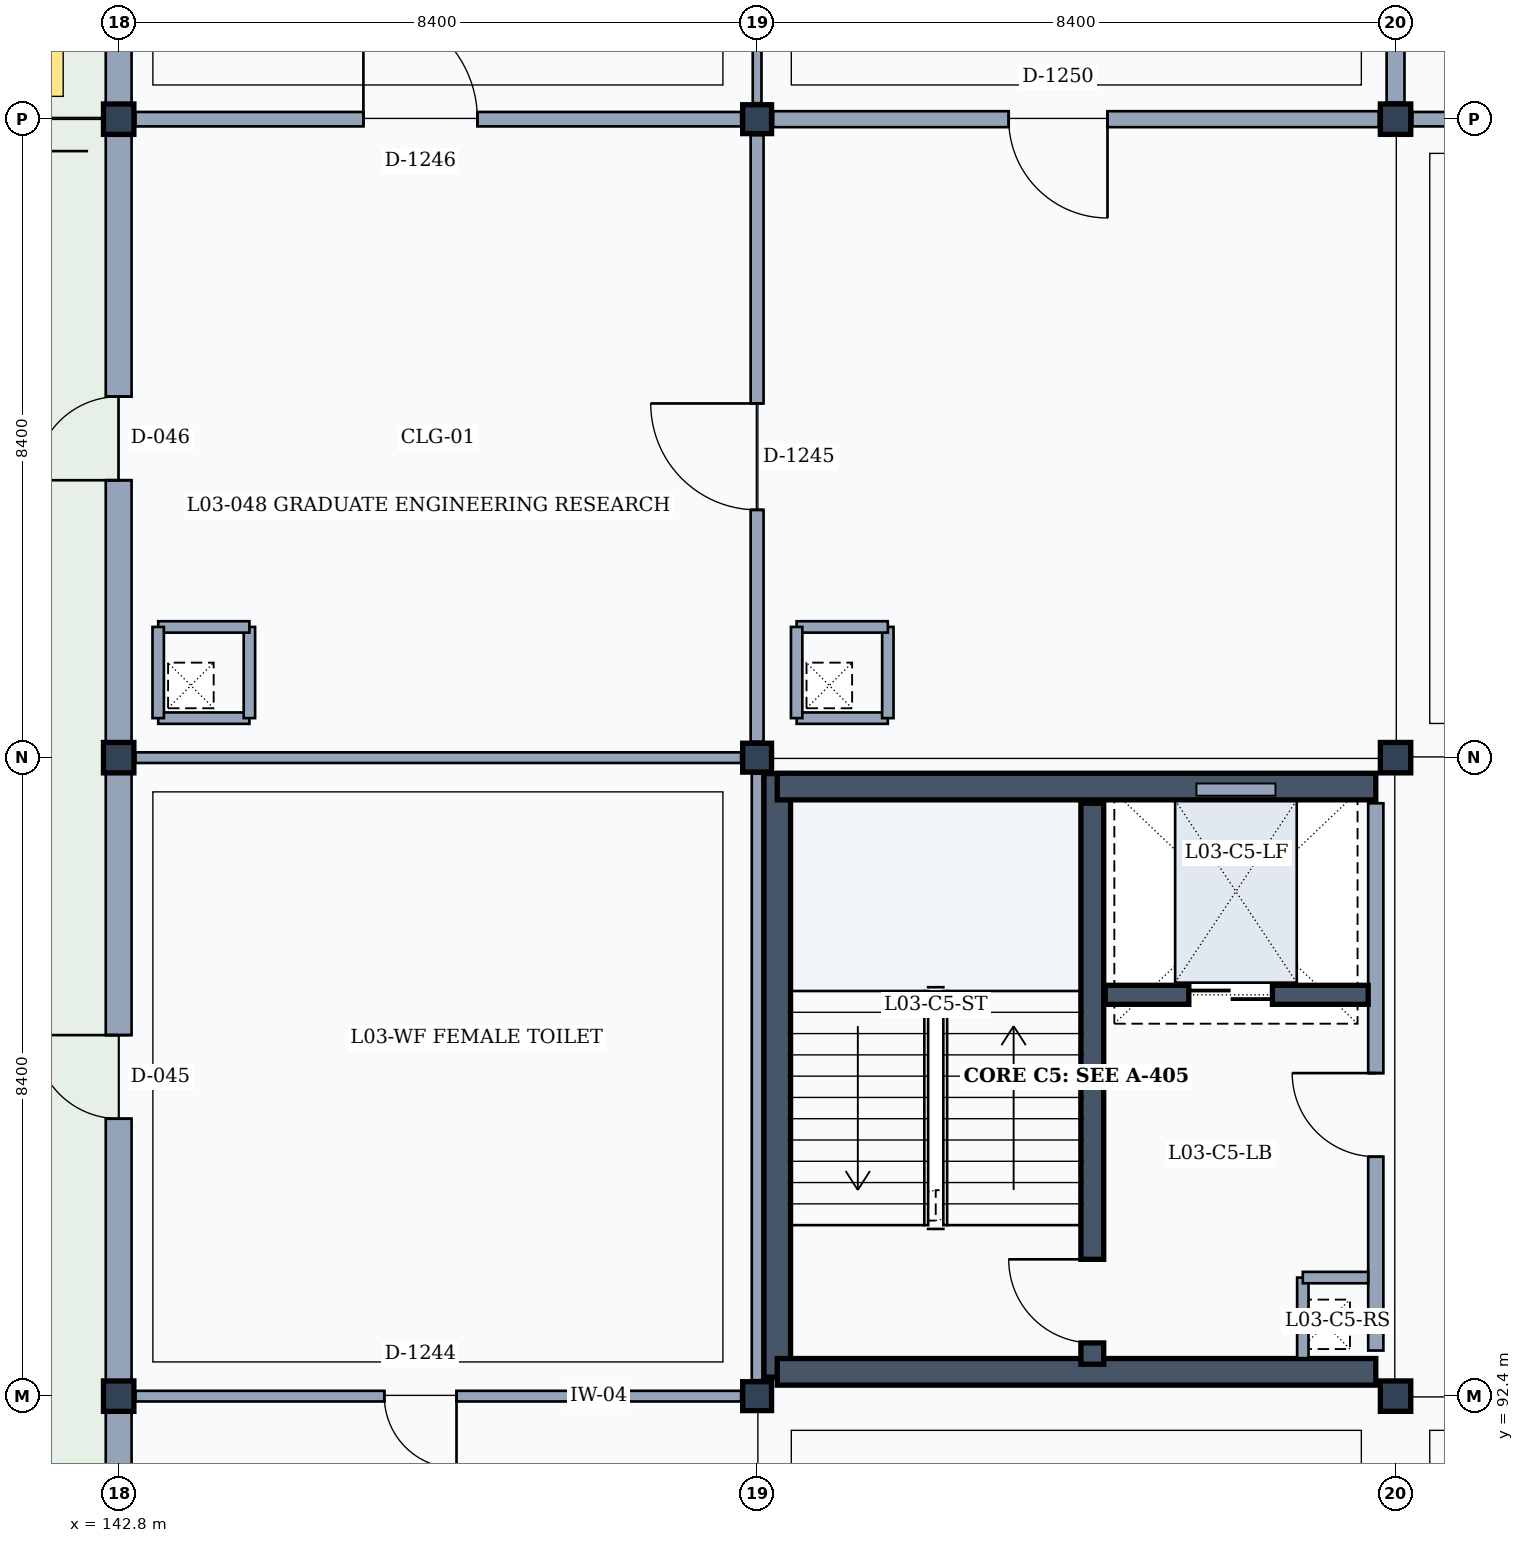
"""IFC4 building model, lengths in metres.
Left out: names, types, materials, properties, quantities, classifications, styles, units other than length and angle.
Written with IfcOpenShell. Run it as: python <this file> out.ifc"""

import sys

from ifc_helpers import new_model, si_unit, direction, frame, frame_2d, origin, origin_2d, place, context, subcontext, project, spatial, rectangle, extrude, element, fill, save


model = new_model("IFC4")
c1 = context("Model", 3, precision=1e-05, world=origin(), true_north=direction((0.0, 1.0)))
c2 = subcontext(c1, "Body", "Model", "MODEL_VIEW")
j1 = project(units=[si_unit("LENGTHUNIT", "METRE"), si_unit("PLANEANGLEUNIT", "RADIAN")], contexts=[c1])
p1 = place(None, origin())
s1 = spatial("IfcSite", under=j1, at=p1, CompositionType="ELEMENT")
p2 = place(p1, origin())
s2 = spatial("IfcBuilding", under=s1, at=p2, CompositionType="ELEMENT")
p3 = place(p2, frame((0.0, 0.0, 13.8)))
s3 = spatial("IfcBuildingStorey", under=s2, at=p3, CompositionType="ELEMENT", Elevation=13.8)
for number, where, z_axis, x_axis in (
    (1, (142.8, 92.4, 0.0), (0.0, 0.0, 1.0), (1.0, 0.0, 0.0)),
    (2, (142.8, 100.8, 0.0), (0.0, 0.0, 1.0), (1.0, 0.0, 0.0)),
    (3, (142.8, 109.2, 0.0), (0.0, 0.0, 1.0), (1.0, 0.0, 0.0)),
):
    element("IfcColumn", number, at=place(p3, frame(where, z_axis=z_axis, x_axis=x_axis)), inside=s3, PredefinedType="COLUMN", context=c2, shape_type="SweptSolid", body=[
        extrude(rectangle(XDim=0.4, YDim=0.4, at=origin_2d()), origin(), (0.0, 0.0, 1.0), 4.2),
    ])
for number, where, z_axis, x_axis in (
    (4, (151.2, 92.4, 0.0), (0.0, 0.0, 1.0), (1.0, 0.0, 0.0)),
    (5, (151.2, 100.8, 0.0), (0.0, 0.0, 1.0), (1.0, 0.0, 0.0)),
    (6, (151.2, 109.2, 0.0), (0.0, 0.0, 1.0), (1.0, 0.0, 0.0)),
):
    element("IfcColumn", number, at=place(p3, frame(where, z_axis=z_axis, x_axis=x_axis)), inside=s3, PredefinedType="COLUMN", context=c2, shape_type="SweptSolid", body=[
        extrude(rectangle(XDim=0.38, YDim=0.38, at=origin_2d()), origin(), (0.0, 0.0, 1.0), 4.2),
    ])
for number, where, z_axis, x_axis in (
    (7, (159.6, 92.4, 0.0), (0.0, 0.0, 1.0), (1.0, 0.0, 0.0)),
    (8, (159.6, 100.8, 0.0), (0.0, 0.0, 1.0), (1.0, 0.0, 0.0)),
    (9, (159.6, 109.2, 0.0), (0.0, 0.0, 1.0), (1.0, 0.0, 0.0)),
):
    element("IfcColumn", number, at=place(p3, frame(where, z_axis=z_axis, x_axis=x_axis)), inside=s3, PredefinedType="COLUMN", context=c2, shape_type="SweptSolid", body=[
        extrude(rectangle(XDim=0.4, YDim=0.4, at=origin_2d()), origin(), (0.0, 0.0, 1.0), 4.2),
    ])
p4 = place(p3, frame((142.8, 84.2, 0.0), z_axis=(0.0, 0.0, 1.0), x_axis=(0.0, 1.0, 0.0)))
e10 = element("IfcWall", 10, at=p4, inside=s3, PredefinedType="SOLIDWALL", context=c2, shape_type="SweptSolid", body=[
    extrude(rectangle(XDim=8.0, YDim=0.34, at=frame_2d((4.0, 0.0))), origin(), (0.0, 0.0, 1.0), 3.36),
])
p5 = place(p4, frame((3.45, 0.0, 0.0)))
e11 = element("IfcOpeningElement", 11, at=p5, cuts=e10, PredefinedType="OPENING", context=c2, shape_type="SweptSolid", body=[
    extrude(rectangle(XDim=1.1, YDim=2.2, at=frame_2d((0.55, 1.1))), frame((0.0, 0.18, 0.0), z_axis=(0.0, -1.0, 0.0), x_axis=(1.0, 0.0, 0.0)), (0.0, 0.0, 1.0), 0.36),
])
p6 = place(p3, frame((142.8, 92.6, 0.0), z_axis=(0.0, 0.0, 1.0), x_axis=(0.0, 1.0, 0.0)))
e12 = element("IfcWall", 12, at=p6, inside=s3, PredefinedType="SOLIDWALL", context=c2, shape_type="SweptSolid", body=[
    extrude(rectangle(XDim=8.0, YDim=0.34, at=frame_2d((4.0, 0.0))), origin(), (0.0, 0.0, 1.0), 3.36),
])
p7 = place(p6, frame((3.45, 0.0, 0.0)))
e13 = element("IfcOpeningElement", 13, at=p7, cuts=e12, PredefinedType="OPENING", context=c2, shape_type="SweptSolid", body=[
    extrude(rectangle(XDim=1.1, YDim=2.2, at=frame_2d((0.55, 1.1))), frame((0.0, 0.18, 0.0), z_axis=(0.0, -1.0, 0.0), x_axis=(1.0, 0.0, 0.0)), (0.0, 0.0, 1.0), 0.36),
])
p8 = place(p3, frame((142.8, 101.0, 0.0), z_axis=(0.0, 0.0, 1.0), x_axis=(0.0, 1.0, 0.0)))
e14 = element("IfcWall", 14, at=p8, inside=s3, PredefinedType="SOLIDWALL", context=c2, shape_type="SweptSolid", body=[
    extrude(rectangle(XDim=8.0, YDim=0.34, at=frame_2d((4.0, 0.0))), origin(), (0.0, 0.0, 1.0), 3.36),
])
p9 = place(p8, frame((3.45, 0.0, 0.0)))
e15 = element("IfcOpeningElement", 15, at=p9, cuts=e14, PredefinedType="OPENING", context=c2, shape_type="SweptSolid", body=[
    extrude(rectangle(XDim=1.1, YDim=2.2, at=frame_2d((0.55, 1.1))), frame((0.0, 0.18, 0.0), z_axis=(0.0, -1.0, 0.0), x_axis=(1.0, 0.0, 0.0)), (0.0, 0.0, 1.0), 0.36),
])
p10 = place(p3, frame((142.8, 109.4, 0.0), z_axis=(0.0, 0.0, 1.0), x_axis=(0.0, 1.0, 0.0)))
e16 = element("IfcWall", 16, at=p10, inside=s3, PredefinedType="SOLIDWALL", context=c2, shape_type="SweptSolid", body=[
    extrude(rectangle(XDim=8.0, YDim=0.34, at=frame_2d((4.0, 0.0))), origin(), (0.0, 0.0, 1.0), 3.36),
])
p11 = place(p10, frame((3.35, 0.0, 0.9)))
e17 = element("IfcOpeningElement", 17, at=p11, cuts=e16, PredefinedType="OPENING", context=c2, shape_type="SweptSolid", body=[
    extrude(rectangle(XDim=1.3, YDim=1.75, at=frame_2d((0.65, 0.875))), frame((0.0, 0.18, 0.0), z_axis=(0.0, -1.0, 0.0), x_axis=(1.0, 0.0, 0.0)), (0.0, 0.0, 1.0), 0.36),
])
p12 = place(p3, frame((151.465, 92.65, 0.0), z_axis=(0.0, 0.0, 1.0), x_axis=(0.0, 1.0, 0.0)))
e18 = element("IfcWall", 18, at=p12, inside=s3, PredefinedType="SHEAR", context=c2, shape_type="SweptSolid", body=[
    extrude(rectangle(XDim=7.94, YDim=0.35, at=frame_2d((3.97, 0.0))), origin(), (0.0, 0.0, 1.0), 3.98),
])
p13 = place(p3, frame((151.465, 100.42, 0.0), z_axis=(0.0, 0.0, 1.0), x_axis=(1.0, 0.0, 0.0)))
e19 = element("IfcWall", 19, at=p13, inside=s3, PredefinedType="SHEAR", context=c2, shape_type="SweptSolid", body=[
    extrude(rectangle(XDim=7.875, YDim=0.35, at=frame_2d((3.938, 0.0))), origin(), (0.0, 0.0, 1.0), 3.98),
])
p14 = place(p3, frame((159.34, 100.2, 0.0), z_axis=(0.0, 0.0, 1.0), x_axis=(0.0, -1.0, 0.0)))
e20 = element("IfcWall", 20, at=p14, inside=s3, PredefinedType="PARTITIONING", context=c2, shape_type="SweptSolid", body=[
    extrude(rectangle(XDim=7.2, YDim=0.2, at=frame_2d((3.6, 0.0))), origin(), (0.0, 0.0, 1.0), 3.32),
])
p15 = place(p14, frame((3.55, 0.0, 0.0)))
e21 = element("IfcOpeningElement", 21, at=p15, cuts=e20, PredefinedType="OPENING", context=c2, shape_type="SweptSolid", body=[
    extrude(rectangle(XDim=1.1, YDim=2.15, at=frame_2d((0.55, 1.075))), frame((0.0, 0.11, 0.0), z_axis=(0.0, -1.0, 0.0), x_axis=(1.0, 0.0, 0.0)), (0.0, 0.0, 1.0), 0.22),
])
p16 = place(p3, frame((159.34, 92.72, 0.0), z_axis=(0.0, 0.0, 1.0), x_axis=(-1.0, 0.0, 0.0)))
e22 = element("IfcWall", 22, at=p16, inside=s3, PredefinedType="SHEAR", context=c2, shape_type="SweptSolid", body=[
    extrude(rectangle(XDim=7.875, YDim=0.35, at=frame_2d((3.938, 0.0))), origin(), (0.0, 0.0, 1.0), 3.98),
])
p17 = place(p3, frame((155.61, 92.82, 0.0), z_axis=(0.0, 0.0, 1.0), x_axis=(0.0, 1.0, 0.0)))
e23 = element("IfcWall", 23, at=p17, inside=s3, PredefinedType="SHEAR", context=c2, shape_type="SweptSolid", body=[
    extrude(rectangle(XDim=7.38, YDim=0.3, at=frame_2d((3.69, 0.0))), origin(), (0.0, 0.0, 1.0), 3.98),
])
p18 = place(p17, frame((0.28, 0.0, 0.0)))
e24 = element("IfcOpeningElement", 24, at=p18, cuts=e23, PredefinedType="OPENING", context=c2, shape_type="SweptSolid", body=[
    extrude(rectangle(XDim=1.1, YDim=2.15, at=frame_2d((0.55, 1.075))), frame((0.0, 0.16, 0.0), z_axis=(0.0, -1.0, 0.0), x_axis=(1.0, 0.0, 0.0)), (0.0, 0.0, 1.0), 0.32),
])
p19 = place(p3, frame((158.38, 93.96, 0.0), z_axis=(0.0, 0.0, 1.0), x_axis=(0.0, -1.0, 0.0)))
e25 = element("IfcWall", 25, at=p19, inside=s3, PredefinedType="PARTITIONING", context=c2, shape_type="SweptSolid", body=[
    extrude(rectangle(XDim=1.06, YDim=0.15, at=frame_2d((0.53, 0.0))), origin(), (0.0, 0.0, 1.0), 3.32),
])
p20 = place(p3, frame((158.38, 93.96, 0.0), z_axis=(0.0, 0.0, 1.0), x_axis=(1.0, 0.0, 0.0)))
e26 = element("IfcWall", 26, at=p20, inside=s3, PredefinedType="PARTITIONING", context=c2, shape_type="SweptSolid", body=[
    extrude(rectangle(XDim=0.86, YDim=0.15, at=frame_2d((0.43, 0.0))), origin(), (0.0, 0.0, 1.0), 3.32),
])
p21 = place(p3, frame((155.78, 97.68, 0.0), z_axis=(0.0, 0.0, 1.0), x_axis=(1.0, 0.0, 0.0)))
e27 = element("IfcWall", 27, at=p21, inside=s3, PredefinedType="SHEAR", context=c2, shape_type="SweptSolid", body=[
    extrude(rectangle(XDim=3.46, YDim=0.25, at=frame_2d((1.73, 0.0))), origin(), (0.0, 0.0, 1.0), 3.98),
])
p22 = place(p21, frame((1.1, 0.0, 0.0)))
e28 = element("IfcOpeningElement", 28, at=p22, cuts=e27, PredefinedType="OPENING", context=c2, shape_type="SweptSolid", body=[
    extrude(rectangle(XDim=1.1, YDim=2.15, at=frame_2d((0.55, 1.075))), frame((0.0, 0.135, 0.0), z_axis=(0.0, -1.0, 0.0), x_axis=(1.0, 0.0, 0.0)), (0.0, 0.0, 1.0), 0.27),
])
for number, where, z_axis, x_axis in (
    (29, (143.32, 101.32, 0.0), (0.0, 0.0, 1.0), (1.0, 0.0, 0.0)),
    (30, (144.52, 101.32, 0.0), (0.0, 0.0, 1.0), (0.0, 1.0, 0.0)),
    (31, (144.52, 102.52, 0.0), (0.0, 0.0, 1.0), (-1.0, 0.0, 0.0)),
    (32, (143.32, 102.52, 0.0), (0.0, 0.0, 1.0), (0.0, -1.0, 0.0)),
    (33, (151.72, 101.32, 0.0), (0.0, 0.0, 1.0), (1.0, 0.0, 0.0)),
    (34, (152.92, 101.32, 0.0), (0.0, 0.0, 1.0), (0.0, 1.0, 0.0)),
    (35, (152.92, 102.52, 0.0), (0.0, 0.0, 1.0), (-1.0, 0.0, 0.0)),
    (36, (151.72, 102.52, 0.0), (0.0, 0.0, 1.0), (0.0, -1.0, 0.0)),
):
    element("IfcWall", number, at=place(p3, frame(where, z_axis=z_axis, x_axis=x_axis)), inside=s3, PredefinedType="PARTITIONING", context=c2, shape_type="SweptSolid", body=[
        extrude(rectangle(XDim=1.2, YDim=0.15, at=frame_2d((0.6, 0.0))), origin(), (0.0, 0.0, 1.0), 3.98),
    ])
p23 = place(p3, frame((143.02, 92.4, 0.0), z_axis=(0.0, 0.0, 1.0), x_axis=(1.0, 0.0, 0.0)))
e37 = element("IfcWall", 37, at=p23, inside=s3, PredefinedType="PARTITIONING", context=c2, shape_type="SweptSolid", body=[
    extrude(rectangle(XDim=7.97, YDim=0.14, at=frame_2d((3.985, 0.0))), origin(), (0.0, 0.0, 1.0), 3.22),
])
p24 = place(p23, frame((3.275, 0.0, 0.0)))
e38 = element("IfcOpeningElement", 38, at=p24, cuts=e37, PredefinedType="OPENING", context=c2, shape_type="SweptSolid", body=[
    extrude(rectangle(XDim=0.95, YDim=2.15, at=frame_2d((0.475, 1.075))), frame((0.0, 0.08, 0.0), z_axis=(0.0, -1.0, 0.0), x_axis=(1.0, 0.0, 0.0)), (0.0, 0.0, 1.0), 0.16),
])
p25 = place(p3, frame((151.2, 92.61, 0.0), z_axis=(0.0, 0.0, 1.0), x_axis=(0.0, 1.0, 0.0)))
e39 = element("IfcWall", 39, at=p25, inside=s3, PredefinedType="PARTITIONING", context=c2, shape_type="SweptSolid", body=[
    extrude(rectangle(XDim=7.98, YDim=0.14, at=frame_2d((3.99, 0.0))), origin(), (0.0, 0.0, 1.0), 3.32),
])
p26 = place(p3, frame((143.02, 100.8, 0.0), z_axis=(0.0, 0.0, 1.0), x_axis=(1.0, 0.0, 0.0)))
e40 = element("IfcWall", 40, at=p26, inside=s3, PredefinedType="PARTITIONING", context=c2, shape_type="SweptSolid", body=[
    extrude(rectangle(XDim=7.97, YDim=0.14, at=frame_2d((3.985, 0.0))), origin(), (0.0, 0.0, 1.0), 3.22),
])
p27 = place(p3, frame((151.2, 101.01, 0.0), z_axis=(0.0, 0.0, 1.0), x_axis=(0.0, 1.0, 0.0)))
e41 = element("IfcWall", 41, at=p27, inside=s3, PredefinedType="PARTITIONING", context=c2, shape_type="SweptSolid", body=[
    extrude(rectangle(XDim=7.98, YDim=0.17, at=frame_2d((3.99, 0.0))), origin(), (0.0, 0.0, 1.0), 3.32),
])
p28 = place(p27, frame((3.05, 0.0, 0.0)))
e42 = element("IfcOpeningElement", 42, at=p28, cuts=e41, PredefinedType="OPENING", context=c2, shape_type="SweptSolid", body=[
    extrude(rectangle(XDim=1.4, YDim=2.25, at=frame_2d((0.7, 1.125))), frame((0.0, 0.095, 0.0), z_axis=(0.0, -1.0, 0.0), x_axis=(1.0, 0.0, 0.0)), (0.0, 0.0, 1.0), 0.19),
])
p29 = place(p3, frame((143.02, 109.2, 0.0), z_axis=(0.0, 0.0, 1.0), x_axis=(1.0, 0.0, 0.0)))
e43 = element("IfcWall", 43, at=p29, inside=s3, PredefinedType="PARTITIONING", context=c2, shape_type="SweptSolid", body=[
    extrude(rectangle(XDim=7.97, YDim=0.19, at=frame_2d((3.985, 0.0))), origin(), (0.0, 0.0, 1.0), 3.22),
])
p30 = place(p29, frame((3.0, 0.0, 0.0)))
e44 = element("IfcOpeningElement", 44, at=p30, cuts=e43, PredefinedType="OPENING", context=c2, shape_type="SweptSolid", body=[
    extrude(rectangle(XDim=1.5, YDim=2.3, at=frame_2d((0.75, 1.15))), frame((0.0, 0.105, 0.0), z_axis=(0.0, -1.0, 0.0), x_axis=(1.0, 0.0, 0.0)), (0.0, 0.0, 1.0), 0.21),
])
p31 = place(p3, frame((151.2, 109.41, 0.0), z_axis=(0.0, 0.0, 1.0), x_axis=(0.0, 1.0, 0.0)))
e45 = element("IfcWall", 45, at=p31, inside=s3, PredefinedType="PARTITIONING", context=c2, shape_type="SweptSolid", body=[
    extrude(rectangle(XDim=7.98, YDim=0.115, at=frame_2d((3.99, 0.0))), origin(), (0.0, 0.0, 1.0), 3.32),
])
p32 = place(p3, frame((151.41, 109.2, 0.0), z_axis=(0.0, 0.0, 1.0), x_axis=(1.0, 0.0, 0.0)))
e46 = element("IfcWall", 46, at=p32, inside=s3, PredefinedType="PARTITIONING", context=c2, shape_type="SweptSolid", body=[
    extrude(rectangle(XDim=7.97, YDim=0.21, at=frame_2d((3.985, 0.0))), origin(), (0.0, 0.0, 1.0), 3.22),
])
p33 = place(p32, frame((3.1, 0.0, 0.0)))
e47 = element("IfcOpeningElement", 47, at=p33, cuts=e46, PredefinedType="OPENING", context=c2, shape_type="SweptSolid", body=[
    extrude(rectangle(XDim=1.3, YDim=2.2, at=frame_2d((0.65, 1.1))), frame((0.0, 0.115, 0.0), z_axis=(0.0, -1.0, 0.0), x_axis=(1.0, 0.0, 0.0)), (0.0, 0.0, 1.0), 0.23),
])
p34 = place(p3, frame((159.6, 109.42, 0.0), z_axis=(0.0, 0.0, 1.0), x_axis=(0.0, 1.0, 0.0)))
e48 = element("IfcWall", 48, at=p34, inside=s3, PredefinedType="PARTITIONING", context=c2, shape_type="SweptSolid", body=[
    extrude(rectangle(XDim=7.96, YDim=0.235, at=frame_2d((3.98, 0.0))), origin(), (0.0, 0.0, 1.0), 3.32),
])
p35 = place(p3, frame((159.82, 109.2, 0.0), z_axis=(0.0, 0.0, 1.0), x_axis=(1.0, 0.0, 0.0)))
e49 = element("IfcWall", 49, at=p35, inside=s3, PredefinedType="PARTITIONING", context=c2, shape_type="SweptSolid", body=[
    extrude(rectangle(XDim=7.97, YDim=0.19, at=frame_2d((3.985, 0.0))), origin(), (0.0, 0.0, 1.0), 3.22),
])
p36 = place(p35, frame((3.025, 0.0, 0.0)))
e50 = element("IfcOpeningElement", 50, at=p36, cuts=e49, PredefinedType="OPENING", context=c2, shape_type="SweptSolid", body=[
    extrude(rectangle(XDim=1.45, YDim=2.35, at=frame_2d((0.725, 1.175))), frame((0.0, 0.105, 0.0), z_axis=(0.0, -1.0, 0.0), x_axis=(1.0, 0.0, 0.0)), (0.0, 0.0, 1.0), 0.21),
])
p37 = place(p7, origin())
e51 = element("IfcDoor", 51, at=p37, inside=s3, OperationType="SINGLE_SWING_RIGHT", PredefinedType="DOOR", context=c2, shape_type="SweptSolid", body=[
    extrude(rectangle(XDim=1.1, YDim=2.2, at=frame_2d((0.55, 1.1))), frame((0.0, 0.025, 0.0), z_axis=(0.0, -1.0, 0.0), x_axis=(1.0, 0.0, 0.0)), (0.0, 0.0, 1.0), 0.05),
])
fill(e13, e51)
p38 = place(p9, origin())
e52 = element("IfcDoor", 52, at=p38, inside=s3, OperationType="SINGLE_SWING_LEFT", PredefinedType="DOOR", context=c2, shape_type="SweptSolid", body=[
    extrude(rectangle(XDim=1.1, YDim=2.2, at=frame_2d((0.55, 1.1))), frame((0.0, 0.025, 0.0), z_axis=(0.0, -1.0, 0.0), x_axis=(1.0, 0.0, 0.0)), (0.0, 0.0, 1.0), 0.05),
])
fill(e15, e52)
p39 = place(p15, frame((1.1, 0.0, 0.0), z_axis=(0.0, 0.0, 1.0), x_axis=(-1.0, 0.0, 0.0)))
e53 = element("IfcDoor", 53, at=p39, inside=s3, OperationType="SINGLE_SWING_RIGHT", PredefinedType="DOOR", context=c2, shape_type="SweptSolid", body=[
    extrude(rectangle(XDim=1.1, YDim=2.15, at=frame_2d((0.55, 1.075))), frame((0.0, 0.025, 0.0), z_axis=(0.0, -1.0, 0.0), x_axis=(1.0, 0.0, 0.0)), (0.0, 0.0, 1.0), 0.05),
])
fill(e21, e53)
p40 = place(p18, origin())
e54 = element("IfcDoor", 54, at=p40, inside=s3, OperationType="SINGLE_SWING_RIGHT", PredefinedType="DOOR", context=c2, shape_type="SweptSolid", body=[
    extrude(rectangle(XDim=1.1, YDim=2.15, at=frame_2d((0.55, 1.075))), frame((0.0, 0.025, 0.0), z_axis=(0.0, -1.0, 0.0), x_axis=(1.0, 0.0, 0.0)), (0.0, 0.0, 1.0), 0.05),
])
fill(e24, e54)
p41 = place(p22, origin())
e55 = element("IfcDoor", 55, at=p41, inside=s3, OperationType="DOUBLE_DOOR_SLIDING", PredefinedType="DOOR", context=c2, shape_type="SweptSolid", body=[
    extrude(rectangle(XDim=1.1, YDim=2.15, at=frame_2d((0.55, 1.075))), frame((0.0, 0.025, 0.0), z_axis=(0.0, -1.0, 0.0), x_axis=(1.0, 0.0, 0.0)), (0.0, 0.0, 1.0), 0.05),
])
fill(e28, e55)
p42 = place(p24, frame((0.95, 0.0, 0.0), z_axis=(0.0, 0.0, 1.0), x_axis=(-1.0, 0.0, 0.0)))
e56 = element("IfcDoor", 56, at=p42, inside=s3, OperationType="SINGLE_SWING_LEFT", PredefinedType="DOOR", context=c2, shape_type="SweptSolid", body=[
    extrude(rectangle(XDim=0.95, YDim=2.15, at=frame_2d((0.475, 1.075))), frame((0.0, 0.025, 0.0), z_axis=(0.0, -1.0, 0.0), x_axis=(1.0, 0.0, 0.0)), (0.0, 0.0, 1.0), 0.05),
])
fill(e38, e56)
p43 = place(p28, origin())
e57 = element("IfcDoor", 57, at=p43, inside=s3, OperationType="SINGLE_SWING_RIGHT", PredefinedType="DOOR", context=c2, shape_type="SweptSolid", body=[
    extrude(rectangle(XDim=1.4, YDim=2.25, at=frame_2d((0.7, 1.125))), frame((0.0, 0.025, 0.0), z_axis=(0.0, -1.0, 0.0), x_axis=(1.0, 0.0, 0.0)), (0.0, 0.0, 1.0), 0.05),
])
fill(e42, e57)
p44 = place(p30, origin())
e58 = element("IfcDoor", 58, at=p44, inside=s3, OperationType="SINGLE_SWING_LEFT", PredefinedType="DOOR", context=c2, shape_type="SweptSolid", body=[
    extrude(rectangle(XDim=1.5, YDim=2.3, at=frame_2d((0.75, 1.15))), frame((0.0, 0.025, 0.0), z_axis=(0.0, -1.0, 0.0), x_axis=(1.0, 0.0, 0.0)), (0.0, 0.0, 1.0), 0.05),
])
fill(e44, e58)
p45 = place(p33, frame((1.3, 0.0, 0.0), z_axis=(0.0, 0.0, 1.0), x_axis=(-1.0, 0.0, 0.0)))
e59 = element("IfcDoor", 59, at=p45, inside=s3, OperationType="SINGLE_SWING_LEFT", PredefinedType="DOOR", context=c2, shape_type="SweptSolid", body=[
    extrude(rectangle(XDim=1.3, YDim=2.2, at=frame_2d((0.65, 1.1))), frame((0.0, 0.025, 0.0), z_axis=(0.0, -1.0, 0.0), x_axis=(1.0, 0.0, 0.0)), (0.0, 0.0, 1.0), 0.05),
])
fill(e47, e59)
save(model, sys.argv[1])
